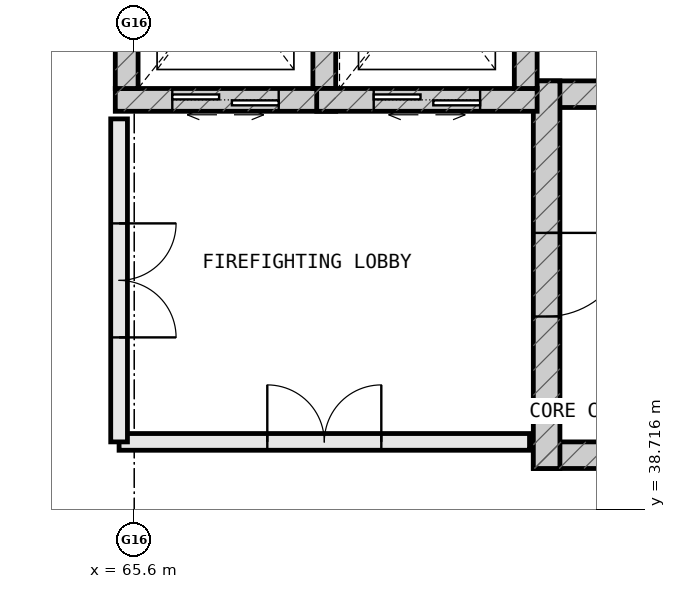
"""IFC4 building model, lengths in metres.
Left out: names, types, materials, properties, quantities, classifications, styles, units other than length and angle.
Written with IfcOpenShell. Run it as: python <this file> out.ifc"""

import sys

from ifc_helpers import new_model, si_unit, direction, frame, frame_2d, origin, place, context, subcontext, project, spatial, rectangle, extrude, element, fill, save


model = new_model("IFC4")
c1 = context("Model", 3, precision=1e-05, world=origin(), true_north=direction((0.0, 1.0)))
c2 = subcontext(c1, "Body", "Model", "MODEL_VIEW")
j1 = project(units=[si_unit("LENGTHUNIT", "METRE"), si_unit("PLANEANGLEUNIT", "RADIAN")], contexts=[c1])
p1 = place(None, origin())
s1 = spatial("IfcSite", under=j1, at=p1, CompositionType="ELEMENT")
p2 = place(p1, origin())
s2 = spatial("IfcBuilding", under=s1, at=p2, CompositionType="ELEMENT")
p3 = place(p2, frame((0.0, 0.0, 46.6)))
s3 = spatial("IfcBuildingStorey", under=s2, at=p3, CompositionType="ELEMENT", Elevation=46.6)
for number, where, z_axis, x_axis in (
    (1, (70.85, 39.425, 0.0), (0.0, 0.0, 1.0), (1.0, 0.0, 0.0)),
    (2, (82.95, 44.175, 0.0), (0.0, 0.0, 1.0), (-1.0, 0.0, 0.0)),
):
    element("IfcWall", number, at=place(p3, frame(where, z_axis=z_axis, x_axis=x_axis)), inside=s3, PredefinedType="SHEAR", context=c2, shape_type="SweptSolid", body=[
        extrude(rectangle(XDim=12.1, YDim=0.35, at=frame_2d((6.05, 0.0))), origin(), (0.0, 0.0, 1.0), 3.99),
    ])
p4 = place(p3, frame((71.025, 44.35, 0.0), z_axis=(0.0, 0.0, 1.0), x_axis=(0.0, -1.0, 0.0)))
e3 = element("IfcWall", 3, at=p4, inside=s3, PredefinedType="SHEAR", context=c2, shape_type="SweptSolid", body=[
    extrude(rectangle(XDim=5.1, YDim=0.35, at=frame_2d((2.55, 0.0))), origin(), (0.0, 0.0, 1.0), 3.99),
])
p5 = place(p4, frame((2.0, 0.0, 0.0)))
e4 = element("IfcOpeningElement", 4, at=p5, cuts=e3, PredefinedType="OPENING", context=c2, shape_type="SweptSolid", body=[
    extrude(rectangle(XDim=1.1, YDim=2.2, at=frame_2d((0.55, 1.1))), frame((0.0, 0.187, 0.0), z_axis=(0.0, -1.0, 0.0), x_axis=(1.0, 0.0, 0.0)), (0.0, 0.0, 1.0), 0.374),
])
p6 = place(p3, frame((65.35, 44.1, 0.0), z_axis=(0.0, 0.0, 1.0), x_axis=(1.0, 0.0, 0.0)))
e5 = element("IfcWall", 5, at=p6, inside=s3, PredefinedType="SHEAR", context=c2, shape_type="SweptSolid", body=[
    extrude(rectangle(XDim=2.9, YDim=0.3, at=frame_2d((1.45, 0.0))), origin(), (0.0, 0.0, 1.0), 3.99),
])
p7 = place(p6, frame((0.75, 0.0, 0.0)))
e6 = element("IfcOpeningElement", 6, at=p7, cuts=e5, PredefinedType="OPENING", context=c2, shape_type="SweptSolid", body=[
    extrude(rectangle(XDim=1.4, YDim=2.2, at=frame_2d((0.7, 1.1))), frame((0.0, 0.162, 0.0), z_axis=(0.0, -1.0, 0.0), x_axis=(1.0, 0.0, 0.0)), (0.0, 0.0, 1.0), 0.324),
])
for number, where, z_axis, x_axis in (
    (7, (68.1, 44.25, 0.0), (0.0, 0.0, 1.0), (0.0, 1.0, 0.0)),
    (8, (65.5, 47.15, 0.0), (0.0, 0.0, 1.0), (0.0, -1.0, 0.0)),
):
    element("IfcWall", number, at=place(p3, frame(where, z_axis=z_axis, x_axis=x_axis)), inside=s3, PredefinedType="SHEAR", context=c2, shape_type="SweptSolid", body=[
        extrude(rectangle(XDim=2.9, YDim=0.3, at=frame_2d((1.45, 0.0))), origin(), (0.0, 0.0, 1.0), 3.99),
    ])
p8 = place(p3, frame((68.0, 44.1, 0.0), z_axis=(0.0, 0.0, 1.0), x_axis=(1.0, 0.0, 0.0)))
e9 = element("IfcWall", 9, at=p8, inside=s3, PredefinedType="SHEAR", context=c2, shape_type="SweptSolid", body=[
    extrude(rectangle(XDim=2.9, YDim=0.3, at=frame_2d((1.45, 0.0))), origin(), (0.0, 0.0, 1.0), 3.99),
])
p9 = place(p8, frame((0.75, 0.0, 0.0)))
e10 = element("IfcOpeningElement", 10, at=p9, cuts=e9, PredefinedType="OPENING", context=c2, shape_type="SweptSolid", body=[
    extrude(rectangle(XDim=1.4, YDim=2.2, at=frame_2d((0.7, 1.1))), frame((0.0, 0.162, 0.0), z_axis=(0.0, -1.0, 0.0), x_axis=(1.0, 0.0, 0.0)), (0.0, 0.0, 1.0), 0.324),
])
p10 = place(p3, frame((70.75, 44.25, 0.0), z_axis=(0.0, 0.0, 1.0), x_axis=(0.0, 1.0, 0.0)))
e11 = element("IfcWall", 11, at=p10, inside=s3, PredefinedType="SHEAR", context=c2, shape_type="SweptSolid", body=[
    extrude(rectangle(XDim=2.9, YDim=0.3, at=frame_2d((1.45, 0.0))), origin(), (0.0, 0.0, 1.0), 3.99),
])
p11 = place(p3, frame((65.4, 39.6, 0.0), z_axis=(0.0, 0.0, 1.0), x_axis=(1.0, 0.0, 0.0)))
e12 = element("IfcWall", 12, at=p11, inside=s3, PredefinedType="STANDARD", context=c2, shape_type="SweptSolid", body=[
    extrude(rectangle(XDim=5.4, YDim=0.22, at=frame_2d((2.7, 0.0))), origin(), (0.0, 0.0, 1.0), 3.99),
])
p12 = place(p11, frame((1.95, 0.0, 0.0)))
e13 = element("IfcOpeningElement", 13, at=p12, cuts=e12, PredefinedType="OPENING", context=c2, shape_type="SweptSolid", body=[
    extrude(rectangle(XDim=1.5, YDim=2.2, at=frame_2d((0.75, 1.1))), frame((0.0, 0.122, 0.0), z_axis=(0.0, -1.0, 0.0), x_axis=(1.0, 0.0, 0.0)), (0.0, 0.0, 1.0), 0.244),
])
p13 = place(p3, frame((65.4, 43.85, 0.0), z_axis=(0.0, 0.0, 1.0), x_axis=(0.0, -1.0, 0.0)))
e14 = element("IfcWall", 14, at=p13, inside=s3, PredefinedType="STANDARD", context=c2, shape_type="SweptSolid", body=[
    extrude(rectangle(XDim=4.25, YDim=0.22, at=frame_2d((2.125, 0.0))), origin(), (0.0, 0.0, 1.0), 3.99),
])
p14 = place(p13, frame((1.375, 0.0, 0.0)))
e15 = element("IfcOpeningElement", 15, at=p14, cuts=e14, PredefinedType="OPENING", context=c2, shape_type="SweptSolid", body=[
    extrude(rectangle(XDim=1.5, YDim=2.2, at=frame_2d((0.75, 1.1))), frame((0.0, 0.122, 0.0), z_axis=(0.0, -1.0, 0.0), x_axis=(1.0, 0.0, 0.0)), (0.0, 0.0, 1.0), 0.244),
])
p15 = place(p5, origin())
e16 = element("IfcDoor", 16, at=p15, inside=s3, OperationType="SINGLE_SWING_LEFT", PredefinedType="DOOR", context=c2, shape_type="SweptSolid", body=[
    extrude(rectangle(XDim=1.1, YDim=2.2, at=frame_2d((0.55, 1.1))), frame((0.0, 0.025, 0.0), z_axis=(0.0, -1.0, 0.0), x_axis=(1.0, 0.0, 0.0)), (0.0, 0.0, 1.0), 0.05),
])
fill(e4, e16)
p16 = place(p7, origin())
e17 = element("IfcDoor", 17, at=p16, inside=s3, OperationType="DOUBLE_DOOR_SLIDING", PredefinedType="DOOR", context=c2, shape_type="SweptSolid", body=[
    extrude(rectangle(XDim=1.4, YDim=2.2, at=frame_2d((0.7, 1.1))), frame((0.0, 0.025, 0.0), z_axis=(0.0, -1.0, 0.0), x_axis=(1.0, 0.0, 0.0)), (0.0, 0.0, 1.0), 0.05),
])
fill(e6, e17)
p17 = place(p9, origin())
e18 = element("IfcDoor", 18, at=p17, inside=s3, OperationType="DOUBLE_DOOR_SLIDING", PredefinedType="DOOR", context=c2, shape_type="SweptSolid", body=[
    extrude(rectangle(XDim=1.4, YDim=2.2, at=frame_2d((0.7, 1.1))), frame((0.0, 0.025, 0.0), z_axis=(0.0, -1.0, 0.0), x_axis=(1.0, 0.0, 0.0)), (0.0, 0.0, 1.0), 0.05),
])
fill(e10, e18)
p18 = place(p12, origin())
e19 = element("IfcDoor", 19, at=p18, inside=s3, OperationType="DOUBLE_DOOR_SINGLE_SWING", PredefinedType="DOOR", context=c2, shape_type="SweptSolid", body=[
    extrude(rectangle(XDim=1.5, YDim=2.2, at=frame_2d((0.75, 1.1))), frame((0.0, 0.025, 0.0), z_axis=(0.0, -1.0, 0.0), x_axis=(1.0, 0.0, 0.0)), (0.0, 0.0, 1.0), 0.05),
])
fill(e13, e19)
p19 = place(p14, origin())
e20 = element("IfcDoor", 20, at=p19, inside=s3, OperationType="DOUBLE_DOOR_SINGLE_SWING", PredefinedType="DOOR", context=c2, shape_type="SweptSolid", body=[
    extrude(rectangle(XDim=1.5, YDim=2.2, at=frame_2d((0.75, 1.1))), frame((0.0, 0.025, 0.0), z_axis=(0.0, -1.0, 0.0), x_axis=(1.0, 0.0, 0.0)), (0.0, 0.0, 1.0), 0.05),
])
fill(e15, e20)
save(model, sys.argv[1])
